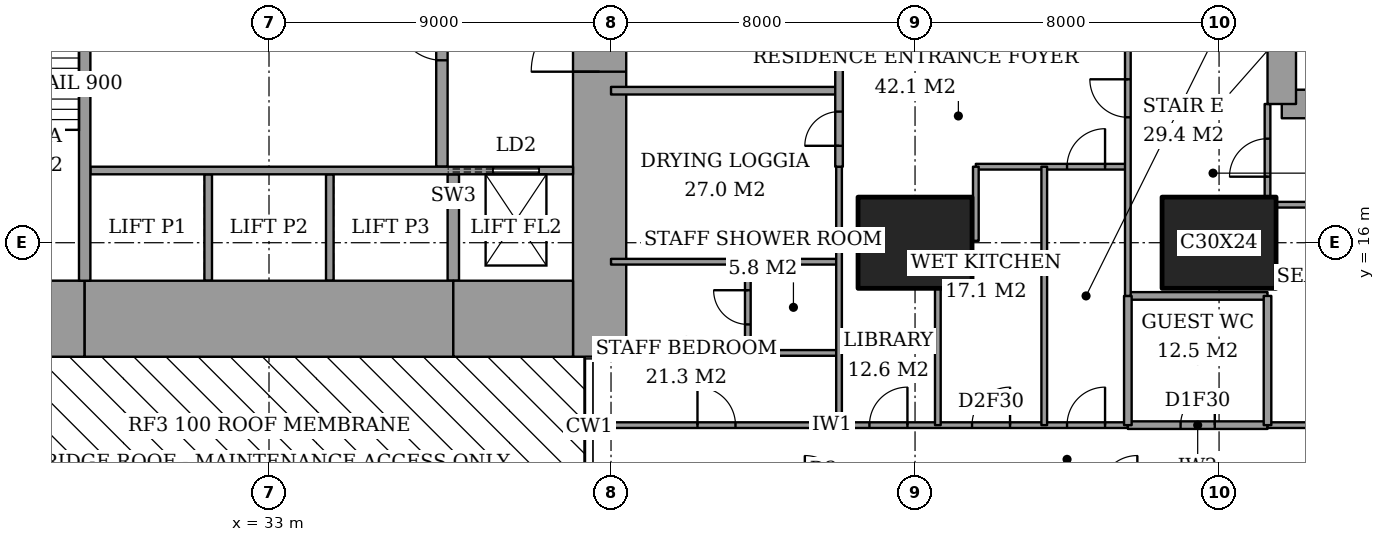
"""IFC4 building model, lengths in metres.
Left out: names, types, materials, properties, quantities, classifications, styles, units other than length and angle.
Written with IfcOpenShell. Run it as: python <this file> out.ifc"""

import sys

from ifc_helpers import new_model, si_unit, direction, frame, frame_2d, origin, origin_2d, place, context, subcontext, project, spatial, rectangle, extrude, element, fill, save


model = new_model("IFC4")
c1 = context("Model", 3, precision=1e-05, world=origin(), true_north=direction((0.0, 1.0)))
c2 = subcontext(c1, "Body", "Model", "MODEL_VIEW")
j1 = project(units=[si_unit("LENGTHUNIT", "METRE"), si_unit("PLANEANGLEUNIT", "RADIAN")], contexts=[c1])
p1 = place(None, origin())
s1 = spatial("IfcSite", under=j1, at=p1, CompositionType="ELEMENT")
p2 = place(p1, origin())
s2 = spatial("IfcBuilding", under=s1, at=p2, CompositionType="ELEMENT")
p3 = place(p2, frame((0.0, 0.0, 182.2)))
s3 = spatial("IfcBuildingStorey", under=s2, at=p3, CompositionType="ELEMENT", Elevation=182.2)
for number, where, z_axis, x_axis in (
    (1, (50.0, 16.0, 0.0), (0.0, 0.0, 1.0), (1.0, 0.0, 0.0)),
    (2, (58.0, 16.0, 0.0), (0.0, 0.0, 1.0), (1.0, 0.0, 0.0)),
):
    element("IfcColumn", number, at=place(p3, frame(where, z_axis=z_axis, x_axis=x_axis)), inside=s3, PredefinedType="COLUMN", context=c2, shape_type="SweptSolid", body=[
        extrude(rectangle(XDim=3.0, YDim=2.4, at=origin_2d()), origin(), (0.0, 0.0, 1.0), 3.6),
    ])
p4 = place(p3, frame((25.0, 14.0, 0.0), z_axis=(0.0, 0.0, 1.0), x_axis=(1.0, 0.0, 0.0)))
e3 = element("IfcWall", 3, at=p4, inside=s3, PredefinedType="SHEAR", context=c2, shape_type="SweptSolid", body=[
    extrude(rectangle(XDim=3.15, YDim=2.0, at=frame_2d((1.575, 0.0))), origin(), (0.0, 0.0, 1.0), 3.6),
])
p5 = place(p3, frame((28.15, 14.0, 0.0), z_axis=(0.0, 0.0, 1.0), x_axis=(1.0, 0.0, 0.0)))
e4 = element("IfcWall", 4, at=p5, inside=s3, PredefinedType="SHEAR", context=c2, shape_type="SweptSolid", body=[
    extrude(rectangle(XDim=9.7, YDim=2.0, at=frame_2d((4.85, 0.0))), origin(), (0.0, 0.0, 1.0), 3.6),
])
p6 = place(p3, frame((37.85, 14.0, 0.0), z_axis=(0.0, 0.0, 1.0), x_axis=(1.0, 0.0, 0.0)))
e5 = element("IfcWall", 5, at=p6, inside=s3, PredefinedType="SHEAR", context=c2, shape_type="SweptSolid", body=[
    extrude(rectangle(XDim=3.15, YDim=2.0, at=frame_2d((1.575, 0.0))), origin(), (0.0, 0.0, 1.0), 3.6),
])
p7 = place(p3, frame((41.7, 13.0, 0.0), z_axis=(0.0, 0.0, 1.0), x_axis=(0.0, 1.0, 0.0)))
e6 = element("IfcWall", 6, at=p7, inside=s3, PredefinedType="SHEAR", context=c2, shape_type="SweptSolid", body=[
    extrude(rectangle(XDim=11.85, YDim=1.4, at=frame_2d((5.925, 0.0))), origin(), (0.0, 0.0, 1.0), 3.6),
])
p8 = place(p7, frame((7.5, 0.0, 0.0)))
e7 = element("IfcOpeningElement", 7, at=p8, cuts=e6, PredefinedType="OPENING", context=c2, shape_type="SweptSolid", body=[
    extrude(rectangle(XDim=1.8, YDim=2.4, at=frame_2d((0.9, 1.2))), frame((0.0, 0.71, 0.0), z_axis=(0.0, -1.0, 0.0), x_axis=(1.0, 0.0, 0.0)), (0.0, 0.0, 1.0), 1.42),
])
p9 = place(p3, frame((28.15, 15.0, 0.0), z_axis=(0.0, 0.0, 1.0), x_axis=(0.0, 1.0, 0.0)))
e8 = element("IfcWall", 8, at=p9, inside=s3, PredefinedType="SHEAR", context=c2, shape_type="SweptSolid", body=[
    extrude(rectangle(XDim=8.15, YDim=0.3, at=frame_2d((4.075, 0.0))), origin(), (0.0, 0.0, 1.0), 3.6),
])
p10 = place(p3, frame((37.55, 18.0, 0.0), z_axis=(0.0, 0.0, 1.0), x_axis=(0.0, 1.0, 0.0)))
e9 = element("IfcWall", 9, at=p10, inside=s3, PredefinedType="PARTITIONING", context=c2, shape_type="SweptSolid", body=[
    extrude(rectangle(XDim=6.7, YDim=0.3, at=frame_2d((3.35, 0.0))), origin(), (0.0, 0.0, 1.0), 3.6),
])
p11 = place(p10, frame((2.8, 0.0, 0.0)))
e10 = element("IfcOpeningElement", 10, at=p11, cuts=e9, PredefinedType="OPENING", context=c2, shape_type="SweptSolid", body=[
    extrude(rectangle(XDim=1.2, YDim=2.1, at=frame_2d((0.6, 1.05))), frame((0.0, 0.16, 0.0), z_axis=(0.0, -1.0, 0.0), x_axis=(1.0, 0.0, 0.0)), (0.0, 0.0, 1.0), 0.32),
])
p12 = place(p3, frame((59.65, 19.65, 0.0), z_axis=(0.0, 0.0, 1.0), x_axis=(1.0, 0.0, 0.0)))
e11 = element("IfcWall", 11, at=p12, inside=s3, PredefinedType="SHEAR", context=c2, shape_type="SweptSolid", body=[
    extrude(rectangle(XDim=4.45, YDim=0.75, at=frame_2d((2.225, 0.0))), origin(), (0.0, 0.0, 1.0), 3.6),
])
p13 = place(p3, frame((59.65, 28.35, 0.0), z_axis=(0.0, 0.0, 1.0), x_axis=(0.0, -1.0, 0.0)))
e12 = element("IfcWall", 12, at=p13, inside=s3, PredefinedType="SHEAR", context=c2, shape_type="SweptSolid", body=[
    extrude(rectangle(XDim=8.7, YDim=0.75, at=frame_2d((4.35, 0.0))), origin(), (0.0, 0.0, 1.0), 3.6),
])
p14 = place(p13, frame((0.975, 0.0, 0.0)))
e13 = element("IfcOpeningElement", 13, at=p14, cuts=e12, PredefinedType="OPENING", context=c2, shape_type="SweptSolid", body=[
    extrude(rectangle(XDim=1.0, YDim=2.1, at=frame_2d((0.5, 1.05))), frame((0.0, 0.385, 0.0), z_axis=(0.0, -1.0, 0.0), x_axis=(1.0, 0.0, 0.0)), (0.0, 0.0, 1.0), 0.77),
])
p15 = place(p3, frame((55.6, 11.2, 0.0), z_axis=(0.0, 0.0, 1.0), x_axis=(1.0, 0.0, 0.0)))
e14 = element("IfcWall", 14, at=p15, inside=s3, PredefinedType="PARTITIONING", context=c2, shape_type="SweptSolid", body=[
    extrude(rectangle(XDim=3.675, YDim=0.2, at=frame_2d((1.837, 0.0))), origin(), (0.0, 0.0, 1.0), 3.35),
])
p16 = place(p15, frame((1.387, 0.0, 0.0)))
e15 = element("IfcOpeningElement", 15, at=p16, cuts=e14, PredefinedType="OPENING", context=c2, shape_type="SweptSolid", body=[
    extrude(rectangle(XDim=0.9, YDim=2.1, at=frame_2d((0.45, 1.05))), frame((0.0, 0.11, 0.0), z_axis=(0.0, -1.0, 0.0), x_axis=(1.0, 0.0, 0.0)), (0.0, 0.0, 1.0), 0.22),
])
p17 = place(p3, frame((41.439, 11.2, 0.0), z_axis=(0.0, 0.0, 1.0), x_axis=(1.0, 0.0, 0.0)))
e16 = element("IfcWall", 16, at=p17, inside=s3, PredefinedType="PARTITIONING", context=c2, shape_type="SweptSolid", body=[
    extrude(rectangle(XDim=14.161, YDim=0.15, at=frame_2d((7.081, 0.0))), origin(), (0.0, 0.0, 1.0), 3.35),
])
p18 = place(p17, frame((12.561, 0.0, 0.0)))
e17 = element("IfcOpeningElement", 17, at=p18, cuts=e16, PredefinedType="OPENING", context=c2, shape_type="SweptSolid", body=[
    extrude(rectangle(XDim=1.0, YDim=2.1, at=frame_2d((0.5, 1.05))), frame((0.0, 0.085, 0.0), z_axis=(0.0, -1.0, 0.0), x_axis=(1.0, 0.0, 0.0)), (0.0, 0.0, 1.0), 0.17),
])
p19 = place(p17, frame((10.061, 0.0, 0.0)))
e18 = element("IfcOpeningElement", 18, at=p19, cuts=e16, PredefinedType="OPENING", context=c2, shape_type="SweptSolid", body=[
    extrude(rectangle(XDim=1.0, YDim=2.1, at=frame_2d((0.5, 1.05))), frame((0.0, 0.085, 0.0), z_axis=(0.0, -1.0, 0.0), x_axis=(1.0, 0.0, 0.0)), (0.0, 0.0, 1.0), 0.17),
])
p20 = place(p17, frame((7.361, 0.0, 0.0)))
e19 = element("IfcOpeningElement", 19, at=p20, cuts=e16, PredefinedType="OPENING", context=c2, shape_type="SweptSolid", body=[
    extrude(rectangle(XDim=1.0, YDim=2.1, at=frame_2d((0.5, 1.05))), frame((0.0, 0.085, 0.0), z_axis=(0.0, -1.0, 0.0), x_axis=(1.0, 0.0, 0.0)), (0.0, 0.0, 1.0), 0.17),
])
p21 = place(p17, frame((2.836, 0.0, 0.0)))
e20 = element("IfcOpeningElement", 20, at=p21, cuts=e16, PredefinedType="OPENING", context=c2, shape_type="SweptSolid", body=[
    extrude(rectangle(XDim=1.0, YDim=2.1, at=frame_2d((0.5, 1.05))), frame((0.0, 0.085, 0.0), z_axis=(0.0, -1.0, 0.0), x_axis=(1.0, 0.0, 0.0)), (0.0, 0.0, 1.0), 0.17),
])
p22 = place(p3, frame((59.275, 11.2, 0.0), z_axis=(0.0, 0.0, 1.0), x_axis=(1.0, 0.0, 0.0)))
e21 = element("IfcWall", 21, at=p22, inside=s3, PredefinedType="PARTITIONING", context=c2, shape_type="SweptSolid", body=[
    extrude(rectangle(XDim=7.175, YDim=0.15, at=frame_2d((3.587, 0.0))), origin(), (0.0, 0.0, 1.0), 3.35),
])
p23 = place(p22, frame((3.087, 0.0, 0.0)))
e22 = element("IfcOpeningElement", 22, at=p23, cuts=e21, PredefinedType="OPENING", context=c2, shape_type="SweptSolid", body=[
    extrude(rectangle(XDim=1.0, YDim=2.1, at=frame_2d((0.5, 1.05))), frame((0.0, 0.085, 0.0), z_axis=(0.0, -1.0, 0.0), x_axis=(1.0, 0.0, 0.0)), (0.0, 0.0, 1.0), 0.17),
])
p24 = place(p3, frame((45.6, 13.1, 0.0), z_axis=(0.0, 0.0, 1.0), x_axis=(1.0, 0.0, 0.0)))
e23 = element("IfcWall", 23, at=p24, inside=s3, PredefinedType="PARTITIONING", context=c2, shape_type="SweptSolid", body=[
    extrude(rectangle(XDim=2.4, YDim=0.15, at=frame_2d((1.2, 0.0))), origin(), (0.0, 0.0, 1.0), 3.35),
])
p25 = place(p3, frame((55.6, 14.6, 0.0), z_axis=(0.0, 0.0, 1.0), x_axis=(1.0, 0.0, 0.0)))
e24 = element("IfcWall", 24, at=p25, inside=s3, PredefinedType="PARTITIONING", context=c2, shape_type="SweptSolid", body=[
    extrude(rectangle(XDim=3.675, YDim=0.2, at=frame_2d((1.837, 0.0))), origin(), (0.0, 0.0, 1.0), 3.35),
])
p26 = place(p3, frame((42.0, 15.5, 0.0), z_axis=(0.0, 0.0, 1.0), x_axis=(1.0, 0.0, 0.0)))
e25 = element("IfcWall", 25, at=p26, inside=s3, PredefinedType="PARTITIONING", context=c2, shape_type="SweptSolid", body=[
    extrude(rectangle(XDim=6.0, YDim=0.15, at=frame_2d((3.0, 0.0))), origin(), (0.0, 0.0, 1.0), 3.35),
])
p27 = place(p3, frame((48.0, 16.05, 0.0), z_axis=(0.0, 0.0, 1.0), x_axis=(1.0, 0.0, 0.0)))
e26 = element("IfcWall", 26, at=p27, inside=s3, PredefinedType="PARTITIONING", context=c2, shape_type="SweptSolid", body=[
    extrude(rectangle(XDim=0.5, YDim=0.15, at=frame_2d((0.25, 0.0))), origin(), (0.0, 0.0, 1.0), 2.634),
])
p28 = place(p3, frame((59.5, 17.0, 0.0), z_axis=(0.0, 0.0, 1.0), x_axis=(1.0, 0.0, 0.0)))
e27 = element("IfcWall", 27, at=p28, inside=s3, PredefinedType="PARTITIONING", context=c2, shape_type="SweptSolid", body=[
    extrude(rectangle(XDim=6.95, YDim=0.15, at=frame_2d((3.475, 0.0))), origin(), (0.0, 0.0, 1.0), 3.35),
])
p29 = place(p3, frame((51.6, 18.0, 0.0), z_axis=(0.0, 0.0, 1.0), x_axis=(1.0, 0.0, 0.0)))
e28 = element("IfcWall", 28, at=p29, inside=s3, PredefinedType="PARTITIONING", context=c2, shape_type="SweptSolid", body=[
    extrude(rectangle(XDim=4.0, YDim=0.15, at=frame_2d((2.0, 0.0))), origin(), (0.0, 0.0, 1.0), 3.35),
])
p30 = place(p29, frame((2.4, 0.0, 0.0)))
e29 = element("IfcOpeningElement", 29, at=p30, cuts=e28, PredefinedType="OPENING", context=c2, shape_type="SweptSolid", body=[
    extrude(rectangle(XDim=1.0, YDim=2.1, at=frame_2d((0.5, 1.05))), frame((0.0, 0.085, 0.0), z_axis=(0.0, -1.0, 0.0), x_axis=(1.0, 0.0, 0.0)), (0.0, 0.0, 1.0), 0.17),
])
p31 = place(p3, frame((42.0, 20.0, 0.0), z_axis=(0.0, 0.0, 1.0), x_axis=(1.0, 0.0, 0.0)))
e30 = element("IfcWall", 30, at=p31, inside=s3, PredefinedType="PARTITIONING", context=c2, shape_type="SweptSolid", body=[
    extrude(rectangle(XDim=6.0, YDim=0.2, at=frame_2d((3.0, 0.0))), origin(), (0.0, 0.0, 1.0), 3.35),
])
p32 = place(p3, frame((45.6, 13.1, 0.0), z_axis=(0.0, 0.0, 1.0), x_axis=(0.0, 1.0, 0.0)))
e31 = element("IfcWall", 31, at=p32, inside=s3, PredefinedType="PARTITIONING", context=c2, shape_type="SweptSolid", body=[
    extrude(rectangle(XDim=2.4, YDim=0.15, at=frame_2d((1.2, 0.0))), origin(), (0.0, 0.0, 1.0), 3.35),
])
p33 = place(p32, frame((0.75, 0.0, 0.0)))
e32 = element("IfcOpeningElement", 32, at=p33, cuts=e31, PredefinedType="OPENING", context=c2, shape_type="SweptSolid", body=[
    extrude(rectangle(XDim=0.9, YDim=2.1, at=frame_2d((0.45, 1.05))), frame((0.0, 0.085, 0.0), z_axis=(0.0, -1.0, 0.0), x_axis=(1.0, 0.0, 0.0)), (0.0, 0.0, 1.0), 0.17),
])
p34 = place(p3, frame((48.0, 18.0, 0.0), z_axis=(0.0, 0.0, 1.0), x_axis=(0.0, 1.0, 0.0)))
e33 = element("IfcWall", 33, at=p34, inside=s3, PredefinedType="PARTITIONING", context=c2, shape_type="SweptSolid", body=[
    extrude(rectangle(XDim=6.0, YDim=0.2, at=frame_2d((3.0, 0.0))), origin(), (0.0, 0.0, 1.0), 3.35),
])
p35 = place(p34, frame((3.4, 0.0, 0.0)))
e34 = element("IfcOpeningElement", 34, at=p35, cuts=e33, PredefinedType="OPENING", context=c2, shape_type="SweptSolid", body=[
    extrude(rectangle(XDim=1.2, YDim=2.4, at=frame_2d((0.6, 1.2))), frame((0.0, 0.11, 0.0), z_axis=(0.0, -1.0, 0.0), x_axis=(1.0, 0.0, 0.0)), (0.0, 0.0, 1.0), 0.22),
])
p36 = place(p34, frame((0.55, 0.0, 0.0)))
e35 = element("IfcOpeningElement", 35, at=p36, cuts=e33, PredefinedType="OPENING", context=c2, shape_type="SweptSolid", body=[
    extrude(rectangle(XDim=0.9, YDim=2.1, at=frame_2d((0.45, 1.05))), frame((0.0, 0.11, 0.0), z_axis=(0.0, -1.0, 0.0), x_axis=(1.0, 0.0, 0.0)), (0.0, 0.0, 1.0), 0.22),
])
p37 = place(p3, frame((48.0, 11.2, 0.0), z_axis=(0.0, 0.0, 1.0), x_axis=(0.0, 1.0, 0.0)))
e36 = element("IfcWall", 36, at=p37, inside=s3, PredefinedType="PARTITIONING", context=c2, shape_type="SweptSolid", body=[
    extrude(rectangle(XDim=6.8, YDim=0.15, at=frame_2d((3.4, 0.0))), origin(), (0.0, 0.0, 1.0), 3.35),
])
p38 = place(p3, frame((50.6, 11.2, 0.0), z_axis=(0.0, 0.0, 1.0), x_axis=(0.0, 1.0, 0.0)))
e37 = element("IfcWall", 37, at=p38, inside=s3, PredefinedType="PARTITIONING", context=c2, shape_type="SweptSolid", body=[
    extrude(rectangle(XDim=3.6, YDim=0.15, at=frame_2d((1.8, 0.0))), origin(), (0.0, 0.0, 1.0), 3.35),
])
p39 = place(p3, frame((51.6, 16.05, 0.0), z_axis=(0.0, 0.0, 1.0), x_axis=(0.0, 1.0, 0.0)))
e38 = element("IfcWall", 38, at=p39, inside=s3, PredefinedType="PARTITIONING", context=c2, shape_type="SweptSolid", body=[
    extrude(rectangle(XDim=1.95, YDim=0.15, at=frame_2d((0.975, 0.0))), origin(), (0.0, 0.0, 1.0), 3.35),
])
p40 = place(p3, frame((53.4, 11.2, 0.0), z_axis=(0.0, 0.0, 1.0), x_axis=(0.0, 1.0, 0.0)))
e39 = element("IfcWall", 39, at=p40, inside=s3, PredefinedType="PARTITIONING", context=c2, shape_type="SweptSolid", body=[
    extrude(rectangle(XDim=6.8, YDim=0.15, at=frame_2d((3.4, 0.0))), origin(), (0.0, 0.0, 1.0), 3.35),
])
p41 = place(p3, frame((55.6, 11.2, 0.0), z_axis=(0.0, 0.0, 1.0), x_axis=(0.0, 1.0, 0.0)))
e40 = element("IfcWall", 40, at=p41, inside=s3, PredefinedType="PARTITIONING", context=c2, shape_type="SweptSolid", body=[
    extrude(rectangle(XDim=3.4, YDim=0.2, at=frame_2d((1.7, 0.0))), origin(), (0.0, 0.0, 1.0), 3.35),
])
p42 = place(p3, frame((55.6, 14.6, 0.0), z_axis=(0.0, 0.0, 1.0), x_axis=(0.0, 1.0, 0.0)))
e41 = element("IfcWall", 41, at=p42, inside=s3, PredefinedType="PARTITIONING", context=c2, shape_type="SweptSolid", body=[
    extrude(rectangle(XDim=7.0, YDim=0.15, at=frame_2d((3.5, 0.0))), origin(), (0.0, 0.0, 1.0), 3.35),
])
p43 = place(p42, frame((4.7, 0.0, 0.0)))
e42 = element("IfcOpeningElement", 42, at=p43, cuts=e41, PredefinedType="OPENING", context=c2, shape_type="SweptSolid", body=[
    extrude(rectangle(XDim=1.0, YDim=2.1, at=frame_2d((0.5, 1.05))), frame((0.0, 0.085, 0.0), z_axis=(0.0, -1.0, 0.0), x_axis=(1.0, 0.0, 0.0)), (0.0, 0.0, 1.0), 0.17),
])
p44 = place(p3, frame((59.275, 11.2, 0.0), z_axis=(0.0, 0.0, 1.0), x_axis=(0.0, 1.0, 0.0)))
e43 = element("IfcWall", 43, at=p44, inside=s3, PredefinedType="PARTITIONING", context=c2, shape_type="SweptSolid", body=[
    extrude(rectangle(XDim=3.4, YDim=0.2, at=frame_2d((1.7, 0.0))), origin(), (0.0, 0.0, 1.0), 3.35),
])
p45 = place(p3, frame((59.275, 17.2, 0.0), z_axis=(0.0, 0.0, 1.0), x_axis=(0.0, 1.0, 0.0)))
e44 = element("IfcWall", 44, at=p45, inside=s3, PredefinedType="PARTITIONING", context=c2, shape_type="SweptSolid", body=[
    extrude(rectangle(XDim=2.45, YDim=0.15, at=frame_2d((1.225, 0.0))), origin(), (0.0, 0.0, 1.0), 3.35),
])
p46 = place(p45, frame((0.538, 0.0, 0.0)))
e45 = element("IfcOpeningElement", 45, at=p46, cuts=e44, PredefinedType="OPENING", context=c2, shape_type="SweptSolid", body=[
    extrude(rectangle(XDim=1.0, YDim=2.1, at=frame_2d((0.5, 1.05))), frame((0.0, 0.085, 0.0), z_axis=(0.0, -1.0, 0.0), x_axis=(1.0, 0.0, 0.0)), (0.0, 0.0, 1.0), 0.17),
])
p47 = place(p3, frame((28.3, 17.9, 0.0), z_axis=(0.0, 0.0, 1.0), x_axis=(1.0, 0.0, 0.0)))
e46 = element("IfcWall", 46, at=p47, inside=s3, PredefinedType="PARTITIONING", context=c2, shape_type="SweptSolid", body=[
    extrude(rectangle(XDim=12.7, YDim=0.2, at=frame_2d((6.35, 0.0))), origin(), (0.0, 0.0, 1.0), 3.6),
])
p48 = place(p47, frame((10.6, 0.0, 0.0)))
e47 = element("IfcOpeningElement", 47, at=p48, cuts=e46, PredefinedType="OPENING", context=c2, shape_type="SweptSolid", body=[
    extrude(rectangle(XDim=1.2, YDim=2.1, at=frame_2d((0.6, 1.05))), frame((0.0, 0.11, 0.0), z_axis=(0.0, -1.0, 0.0), x_axis=(1.0, 0.0, 0.0)), (0.0, 0.0, 1.0), 0.22),
])
for number, where, z_axis, x_axis in (
    (48, (31.4, 15.0, 0.0), (0.0, 0.0, 1.0), (0.0, 1.0, 0.0)),
    (49, (34.6, 15.0, 0.0), (0.0, 0.0, 1.0), (0.0, 1.0, 0.0)),
):
    element("IfcWall", number, at=place(p3, frame(where, z_axis=z_axis, x_axis=x_axis)), inside=s3, PredefinedType="PARTITIONING", context=c2, shape_type="SweptSolid", body=[
        extrude(rectangle(XDim=2.8, YDim=0.2, at=frame_2d((1.4, 0.0))), origin(), (0.0, 0.0, 1.0), 3.6),
    ])
p49 = place(p3, frame((37.85, 15.0, 0.0), z_axis=(0.0, 0.0, 1.0), x_axis=(0.0, 1.0, 0.0)))
e50 = element("IfcWall", 50, at=p49, inside=s3, PredefinedType="SHEAR", context=c2, shape_type="SweptSolid", body=[
    extrude(rectangle(XDim=2.8, YDim=0.3, at=frame_2d((1.4, 0.0))), origin(), (0.0, 0.0, 1.0), 3.6),
])
p50 = place(p18, origin())
e51 = element("IfcDoor", 51, at=p50, inside=s3, OperationType="SINGLE_SWING_LEFT", PredefinedType="DOOR", context=c2, shape_type="SweptSolid", body=[
    extrude(rectangle(XDim=1.0, YDim=2.1, at=frame_2d((0.5, 1.05))), frame((0.0, 0.025, 0.0), z_axis=(0.0, -1.0, 0.0), x_axis=(1.0, 0.0, 0.0)), (0.0, 0.0, 1.0), 0.05),
])
fill(e17, e51)
p51 = place(p46, origin())
e52 = element("IfcDoor", 52, at=p51, inside=s3, OperationType="SINGLE_SWING_RIGHT", PredefinedType="DOOR", context=c2, shape_type="SweptSolid", body=[
    extrude(rectangle(XDim=1.0, YDim=2.1, at=frame_2d((0.5, 1.05))), frame((0.0, 0.025, 0.0), z_axis=(0.0, -1.0, 0.0), x_axis=(1.0, 0.0, 0.0)), (0.0, 0.0, 1.0), 0.05),
])
fill(e45, e52)
p52 = place(p16, origin())
e53 = element("IfcDoor", 53, at=p52, inside=s3, OperationType="SINGLE_SWING_LEFT", PredefinedType="DOOR", context=c2, shape_type="SweptSolid", body=[
    extrude(rectangle(XDim=0.9, YDim=2.1, at=frame_2d((0.45, 1.05))), frame((0.0, 0.025, 0.0), z_axis=(0.0, -1.0, 0.0), x_axis=(1.0, 0.0, 0.0)), (0.0, 0.0, 1.0), 0.05),
])
fill(e15, e53)
p53 = place(p43, origin())
e54 = element("IfcDoor", 54, at=p53, inside=s3, OperationType="SINGLE_SWING_LEFT", PredefinedType="DOOR", context=c2, shape_type="SweptSolid", body=[
    extrude(rectangle(XDim=1.0, YDim=2.1, at=frame_2d((0.5, 1.05))), frame((0.0, 0.025, 0.0), z_axis=(0.0, -1.0, 0.0), x_axis=(1.0, 0.0, 0.0)), (0.0, 0.0, 1.0), 0.05),
])
fill(e42, e54)
p54 = place(p30, origin())
e55 = element("IfcDoor", 55, at=p54, inside=s3, OperationType="SINGLE_SWING_LEFT", PredefinedType="DOOR", context=c2, shape_type="SweptSolid", body=[
    extrude(rectangle(XDim=1.0, YDim=2.1, at=frame_2d((0.5, 1.05))), frame((0.0, 0.025, 0.0), z_axis=(0.0, -1.0, 0.0), x_axis=(1.0, 0.0, 0.0)), (0.0, 0.0, 1.0), 0.05),
])
fill(e29, e55)
p55 = place(p19, origin())
e56 = element("IfcDoor", 56, at=p55, inside=s3, OperationType="SINGLE_SWING_LEFT", PredefinedType="DOOR", context=c2, shape_type="SweptSolid", body=[
    extrude(rectangle(XDim=1.0, YDim=2.1, at=frame_2d((0.5, 1.05))), frame((0.0, 0.025, 0.0), z_axis=(0.0, -1.0, 0.0), x_axis=(1.0, 0.0, 0.0)), (0.0, 0.0, 1.0), 0.05),
])
fill(e18, e56)
p56 = place(p20, origin())
e57 = element("IfcDoor", 57, at=p56, inside=s3, OperationType="SINGLE_SWING_LEFT", PredefinedType="DOOR", context=c2, shape_type="SweptSolid", body=[
    extrude(rectangle(XDim=1.0, YDim=2.1, at=frame_2d((0.5, 1.05))), frame((0.0, 0.025, 0.0), z_axis=(0.0, -1.0, 0.0), x_axis=(1.0, 0.0, 0.0)), (0.0, 0.0, 1.0), 0.05),
])
fill(e19, e57)
p57 = place(p33, origin())
e58 = element("IfcDoor", 58, at=p57, inside=s3, OperationType="SINGLE_SWING_LEFT", PredefinedType="DOOR", context=c2, shape_type="SweptSolid", body=[
    extrude(rectangle(XDim=0.9, YDim=2.1, at=frame_2d((0.45, 1.05))), frame((0.0, 0.025, 0.0), z_axis=(0.0, -1.0, 0.0), x_axis=(1.0, 0.0, 0.0)), (0.0, 0.0, 1.0), 0.05),
])
fill(e32, e58)
p58 = place(p21, origin())
e59 = element("IfcDoor", 59, at=p58, inside=s3, OperationType="SINGLE_SWING_RIGHT", PredefinedType="DOOR", context=c2, shape_type="SweptSolid", body=[
    extrude(rectangle(XDim=1.0, YDim=2.1, at=frame_2d((0.5, 1.05))), frame((0.0, 0.025, 0.0), z_axis=(0.0, -1.0, 0.0), x_axis=(1.0, 0.0, 0.0)), (0.0, 0.0, 1.0), 0.05),
])
fill(e20, e59)
p59 = place(p36, origin())
e60 = element("IfcDoor", 60, at=p59, inside=s3, OperationType="SINGLE_SWING_RIGHT", PredefinedType="DOOR", context=c2, shape_type="SweptSolid", body=[
    extrude(rectangle(XDim=0.9, YDim=2.1, at=frame_2d((0.45, 1.05))), frame((0.0, 0.025, 0.0), z_axis=(0.0, -1.0, 0.0), x_axis=(1.0, 0.0, 0.0)), (0.0, 0.0, 1.0), 0.05),
])
fill(e35, e60)
p60 = place(p11, origin())
e61 = element("IfcDoor", 61, at=p60, inside=s3, OperationType="SINGLE_SWING_LEFT", PredefinedType="DOOR", context=c2, shape_type="SweptSolid", body=[
    extrude(rectangle(XDim=1.2, YDim=2.1, at=frame_2d((0.6, 1.05))), frame((0.0, 0.025, 0.0), z_axis=(0.0, -1.0, 0.0), x_axis=(1.0, 0.0, 0.0)), (0.0, 0.0, 1.0), 0.05),
])
fill(e10, e61)
p61 = place(p8, origin())
e62 = element("IfcDoor", 62, at=p61, inside=s3, OperationType="DOUBLE_DOOR_DOUBLE_SWING", PredefinedType="DOOR", context=c2, shape_type="SweptSolid", body=[
    extrude(rectangle(XDim=1.8, YDim=2.4, at=frame_2d((0.9, 1.2))), frame((0.0, 0.025, 0.0), z_axis=(0.0, -1.0, 0.0), x_axis=(1.0, 0.0, 0.0)), (0.0, 0.0, 1.0), 0.05),
])
fill(e7, e62)
p62 = place(p48, origin())
e63 = element("IfcDoor", 63, at=p62, inside=s3, OperationType="SLIDING_TO_LEFT", PredefinedType="DOOR", context=c2, shape_type="SweptSolid", body=[
    extrude(rectangle(XDim=1.2, YDim=2.1, at=frame_2d((0.6, 1.05))), frame((0.0, 0.025, 0.0), z_axis=(0.0, -1.0, 0.0), x_axis=(1.0, 0.0, 0.0)), (0.0, 0.0, 1.0), 0.05),
])
fill(e47, e63)
save(model, sys.argv[1])
